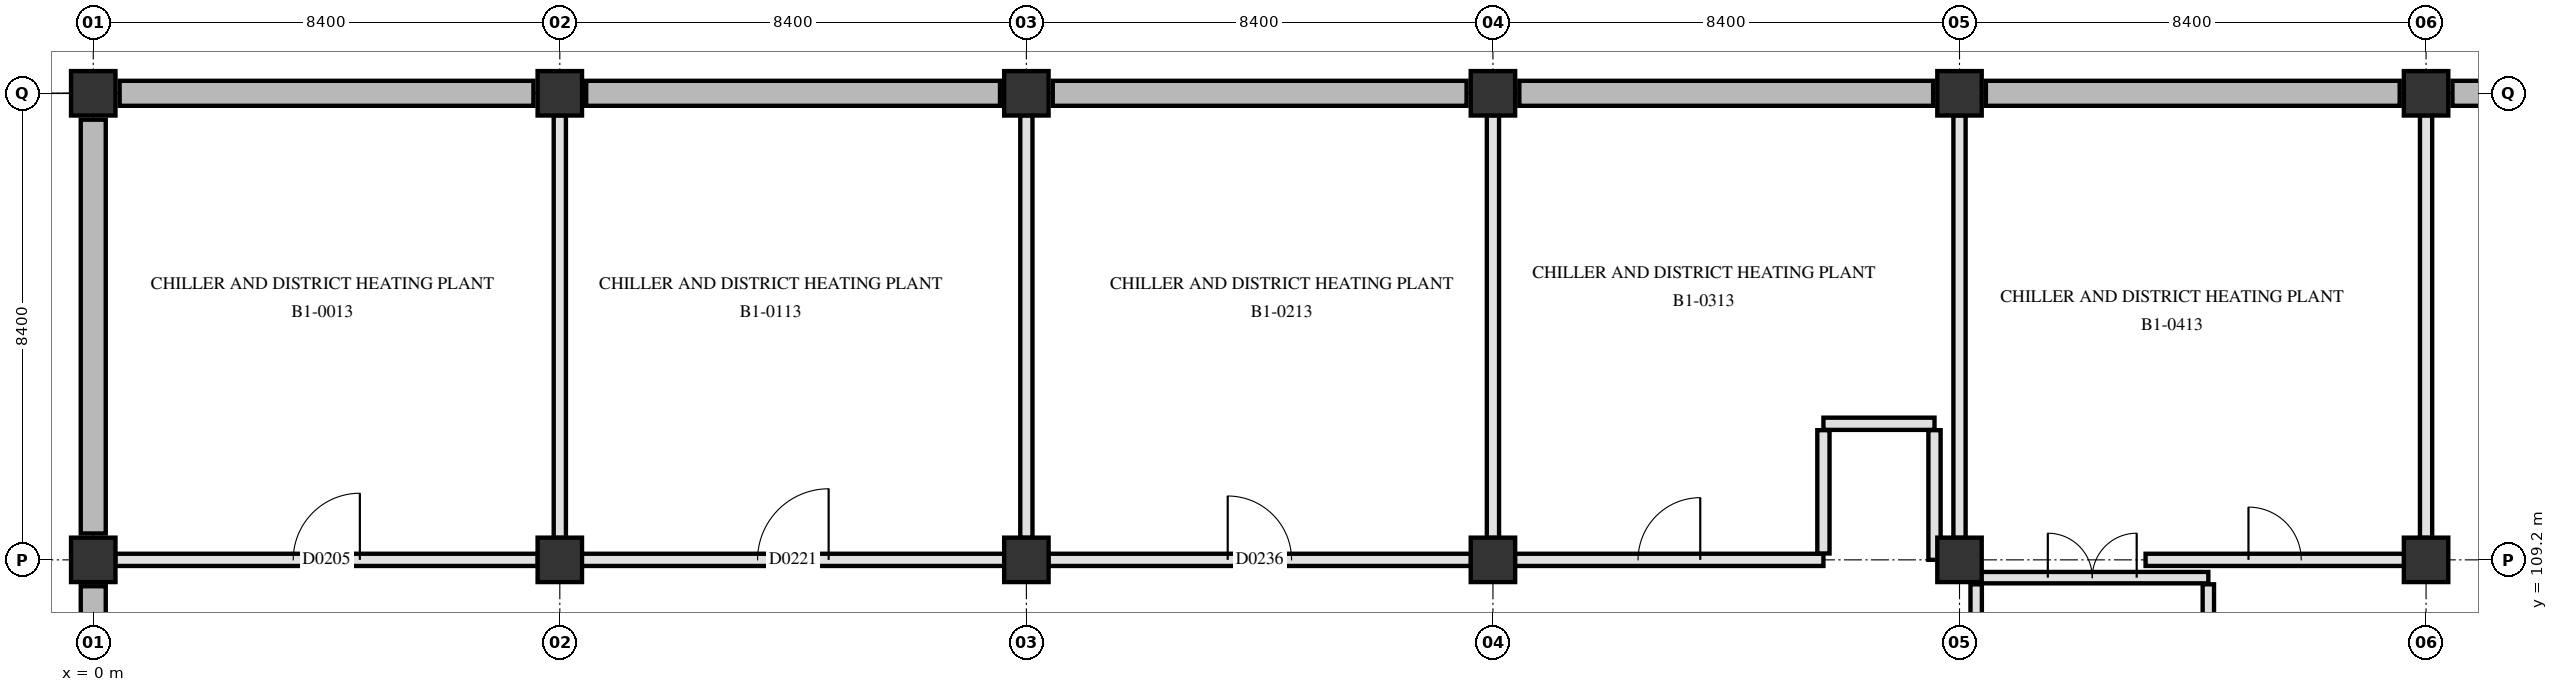
"""IFC4 building model, lengths in metres.
Left out: names, types, materials, properties, quantities, classifications, styles, units other than length and angle.
Written with IfcOpenShell. Run it as: python <this file> out.ifc"""

import sys

from ifc_helpers import new_model, si_unit, direction, frame, frame_2d, origin, origin_2d, place, context, subcontext, project, spatial, rectangle, extrude, element, fill, save


model = new_model("IFC4")
c1 = context("Model", 3, precision=1e-05, world=origin(), true_north=direction((0.0, 1.0)))
c2 = subcontext(c1, "Body", "Model", "MODEL_VIEW")
j1 = project(units=[si_unit("LENGTHUNIT", "METRE"), si_unit("PLANEANGLEUNIT", "RADIAN")], contexts=[c1])
p1 = place(None, origin())
s1 = spatial("IfcSite", under=j1, at=p1, CompositionType="ELEMENT")
p2 = place(p1, origin())
s2 = spatial("IfcBuilding", under=s1, at=p2, CompositionType="ELEMENT")
p3 = place(p2, frame((0.0, 0.0, -5.4)))
s3 = spatial("IfcBuildingStorey", under=s2, at=p3, CompositionType="ELEMENT", Elevation=-5.4)
for number, where, z_axis, x_axis in (
    (1, (0.0, 109.2, 0.0), (0.0, 0.0, 1.0), (1.0, 0.0, 0.0)),
    (2, (0.0, 117.6, 0.0), (0.0, 0.0, 1.0), (1.0, 0.0, 0.0)),
    (3, (8.4, 109.2, 0.0), (0.0, 0.0, 1.0), (1.0, 0.0, 0.0)),
    (4, (8.4, 117.6, 0.0), (0.0, 0.0, 1.0), (1.0, 0.0, 0.0)),
    (5, (16.8, 109.2, 0.0), (0.0, 0.0, 1.0), (1.0, 0.0, 0.0)),
    (6, (16.8, 117.6, 0.0), (0.0, 0.0, 1.0), (1.0, 0.0, 0.0)),
    (7, (25.2, 109.2, 0.0), (0.0, 0.0, 1.0), (1.0, 0.0, 0.0)),
    (8, (25.2, 117.6, 0.0), (0.0, 0.0, 1.0), (1.0, 0.0, 0.0)),
    (9, (33.6, 109.2, 0.0), (0.0, 0.0, 1.0), (1.0, 0.0, 0.0)),
    (10, (33.6, 117.6, 0.0), (0.0, 0.0, 1.0), (1.0, 0.0, 0.0)),
    (11, (42.0, 109.2, 0.0), (0.0, 0.0, 1.0), (1.0, 0.0, 0.0)),
    (12, (42.0, 117.6, 0.0), (0.0, 0.0, 1.0), (1.0, 0.0, 0.0)),
):
    element("IfcColumn", number, at=place(p3, frame(where, z_axis=z_axis, x_axis=x_axis)), inside=s3, PredefinedType="COLUMN", context=c2, shape_type="SweptSolid", body=[
        extrude(rectangle(XDim=0.8, YDim=0.8, at=origin_2d()), origin(), (0.0, 0.0, 1.0), 5.4),
    ])
p4 = place(p3, frame((0.0, 101.275, 0.0), z_axis=(0.0, 0.0, 1.0), x_axis=(0.0, 1.0, 0.0)))
e13 = element("IfcWall", 13, at=p4, inside=s3, PredefinedType="SOLIDWALL", context=c2, shape_type="SweptSolid", body=[
    extrude(rectangle(XDim=7.45, YDim=0.45, at=frame_2d((3.725, 0.0))), origin(), (0.0, 0.0, 1.0), 5.08),
])
for number, where, z_axis, x_axis in (
    (14, (0.0, 109.675, 0.0), (0.0, 0.0, 1.0), (0.0, 1.0, 0.0)),
    (15, (0.475, 117.6, 0.0), (0.0, 0.0, 1.0), (1.0, 0.0, 0.0)),
    (16, (8.875, 117.6, 0.0), (0.0, 0.0, 1.0), (1.0, 0.0, 0.0)),
):
    element("IfcWall", number, at=place(p3, frame(where, z_axis=z_axis, x_axis=x_axis)), inside=s3, PredefinedType="SOLIDWALL", context=c2, shape_type="SweptSolid", body=[
        extrude(rectangle(XDim=7.45, YDim=0.45, at=frame_2d((3.725, 0.0))), origin(), (0.0, 0.0, 1.0), 5.08),
    ])
p5 = place(p3, frame((17.275, 117.6, 0.0), z_axis=(0.0, 0.0, 1.0), x_axis=(1.0, 0.0, 0.0)))
e17 = element("IfcWall", 17, at=p5, inside=s3, PredefinedType="SOLIDWALL", context=c2, shape_type="SweptSolid", body=[
    extrude(rectangle(XDim=7.45, YDim=0.45, at=frame_2d((3.725, 0.0))), origin(), (0.0, 0.0, 1.0), 5.08),
])
for number, where, z_axis, x_axis in (
    (18, (25.675, 117.6, 0.0), (0.0, 0.0, 1.0), (1.0, 0.0, 0.0)),
    (19, (34.075, 117.6, 0.0), (0.0, 0.0, 1.0), (1.0, 0.0, 0.0)),
    (20, (42.475, 117.6, 0.0), (0.0, 0.0, 1.0), (1.0, 0.0, 0.0)),
):
    element("IfcWall", number, at=place(p3, frame(where, z_axis=z_axis, x_axis=x_axis)), inside=s3, PredefinedType="SOLIDWALL", context=c2, shape_type="SweptSolid", body=[
        extrude(rectangle(XDim=7.45, YDim=0.45, at=frame_2d((3.725, 0.0))), origin(), (0.0, 0.0, 1.0), 5.08),
    ])
p6 = place(p3, frame((38.08, 104.64, 0.0), z_axis=(0.0, 0.0, 1.0), x_axis=(0.0, 1.0, 0.0)))
e21 = element("IfcWall", 21, at=p6, inside=s3, PredefinedType="PARTITIONING", context=c2, shape_type="SweptSolid", body=[
    extrude(rectangle(XDim=4.12, YDim=0.205, at=frame_2d((2.06, 0.0))), origin(), (0.0, 0.0, 1.0), 5.07),
])
p7 = place(p3, frame((33.9, 104.64, 0.0), z_axis=(0.0, 0.0, 1.0), x_axis=(0.0, 1.0, 0.0)))
e22 = element("IfcWall", 22, at=p7, inside=s3, PredefinedType="PARTITIONING", context=c2, shape_type="SweptSolid", body=[
    extrude(rectangle(XDim=4.12, YDim=0.205, at=frame_2d((2.06, 0.0))), origin(), (0.0, 0.0, 1.0), 4.47),
])
p8 = place(p3, frame((33.9, 108.88, 0.0), z_axis=(0.0, 0.0, 1.0), x_axis=(1.0, 0.0, 0.0)))
e23 = element("IfcWall", 23, at=p8, inside=s3, PredefinedType="PARTITIONING", context=c2, shape_type="SweptSolid", body=[
    extrude(rectangle(XDim=4.18, YDim=0.205, at=frame_2d((2.09, 0.0))), origin(), (0.0, 0.0, 1.0), 4.42),
])
p9 = place(p8, frame((1.29, 0.0, 0.0)))
e24 = element("IfcOpeningElement", 24, at=p9, cuts=e23, PredefinedType="OPENING", context=c2, shape_type="SweptSolid", body=[
    extrude(rectangle(XDim=1.6, YDim=2.25, at=frame_2d((0.8, 1.125))), frame((0.0, 0.113, 0.0), z_axis=(0.0, -1.0, 0.0), x_axis=(1.0, 0.0, 0.0)), (0.0, 0.0, 1.0), 0.225),
])
p10 = place(p3, frame((0.395, 109.2, 0.0), z_axis=(0.0, 0.0, 1.0), x_axis=(1.0, 0.0, 0.0)))
e25 = element("IfcWall", 25, at=p10, inside=s3, PredefinedType="PARTITIONING", context=c2, shape_type="SweptSolid", body=[
    extrude(rectangle(XDim=7.61, YDim=0.22, at=frame_2d((3.805, 0.0))), origin(), (0.0, 0.0, 1.0), 4.42),
])
p11 = place(p10, frame((3.205, 0.0, 0.0)))
e26 = element("IfcOpeningElement", 26, at=p11, cuts=e25, PredefinedType="OPENING", context=c2, shape_type="SweptSolid", body=[
    extrude(rectangle(XDim=1.2, YDim=2.15, at=frame_2d((0.6, 1.075))), frame((0.0, 0.12, 0.0), z_axis=(0.0, -1.0, 0.0), x_axis=(1.0, 0.0, 0.0)), (0.0, 0.0, 1.0), 0.24),
])
p12 = place(p3, frame((8.795, 109.2, 0.0), z_axis=(0.0, 0.0, 1.0), x_axis=(1.0, 0.0, 0.0)))
e27 = element("IfcWall", 27, at=p12, inside=s3, PredefinedType="PARTITIONING", context=c2, shape_type="SweptSolid", body=[
    extrude(rectangle(XDim=7.61, YDim=0.22, at=frame_2d((3.805, 0.0))), origin(), (0.0, 0.0, 1.0), 4.42),
])
p13 = place(p12, frame((3.165, 0.0, 0.0)))
e28 = element("IfcOpeningElement", 28, at=p13, cuts=e27, PredefinedType="OPENING", context=c2, shape_type="SweptSolid", body=[
    extrude(rectangle(XDim=1.28, YDim=2.18, at=frame_2d((0.64, 1.09))), frame((0.0, 0.12, 0.0), z_axis=(0.0, -1.0, 0.0), x_axis=(1.0, 0.0, 0.0)), (0.0, 0.0, 1.0), 0.24),
])
p14 = place(p3, frame((17.195, 109.2, 0.0), z_axis=(0.0, 0.0, 1.0), x_axis=(1.0, 0.0, 0.0)))
e29 = element("IfcWall", 29, at=p14, inside=s3, PredefinedType="PARTITIONING", context=c2, shape_type="SweptSolid", body=[
    extrude(rectangle(XDim=7.61, YDim=0.22, at=frame_2d((3.805, 0.0))), origin(), (0.0, 0.0, 1.0), 4.42),
])
p15 = place(p14, frame((3.23, 0.0, 0.0)))
e30 = element("IfcOpeningElement", 30, at=p15, cuts=e29, PredefinedType="OPENING", context=c2, shape_type="SweptSolid", body=[
    extrude(rectangle(XDim=1.15, YDim=2.15, at=frame_2d((0.575, 1.075))), frame((0.0, 0.12, 0.0), z_axis=(0.0, -1.0, 0.0), x_axis=(1.0, 0.0, 0.0)), (0.0, 0.0, 1.0), 0.24),
])
p16 = place(p3, frame((25.595, 109.2, 0.0), z_axis=(0.0, 0.0, 1.0), x_axis=(1.0, 0.0, 0.0)))
e31 = element("IfcWall", 31, at=p16, inside=s3, PredefinedType="PARTITIONING", context=c2, shape_type="SweptSolid", body=[
    extrude(rectangle(XDim=5.555, YDim=0.22, at=frame_2d((2.777, 0.0))), origin(), (0.0, 0.0, 1.0), 4.42),
])
p17 = place(p16, frame((2.218, 0.0, 0.0)))
e32 = element("IfcOpeningElement", 32, at=p17, cuts=e31, PredefinedType="OPENING", context=c2, shape_type="SweptSolid", body=[
    extrude(rectangle(XDim=1.12, YDim=2.18, at=frame_2d((0.56, 1.09))), frame((0.0, 0.12, 0.0), z_axis=(0.0, -1.0, 0.0), x_axis=(1.0, 0.0, 0.0)), (0.0, 0.0, 1.0), 0.24),
])
p18 = place(p3, frame((36.95, 109.2, 0.0), z_axis=(0.0, 0.0, 1.0), x_axis=(1.0, 0.0, 0.0)))
e33 = element("IfcWall", 33, at=p18, inside=s3, PredefinedType="PARTITIONING", context=c2, shape_type="SweptSolid", body=[
    extrude(rectangle(XDim=4.655, YDim=0.22, at=frame_2d((2.328, 0.0))), origin(), (0.0, 0.0, 1.0), 4.42),
])
p19 = place(p18, frame((1.853, 0.0, 0.0)))
e34 = element("IfcOpeningElement", 34, at=p19, cuts=e33, PredefinedType="OPENING", context=c2, shape_type="SweptSolid", body=[
    extrude(rectangle(XDim=0.95, YDim=2.1, at=frame_2d((0.475, 1.05))), frame((0.0, 0.12, 0.0), z_axis=(0.0, -1.0, 0.0), x_axis=(1.0, 0.0, 0.0)), (0.0, 0.0, 1.0), 0.24),
])
p20 = place(p3, frame((31.15, 111.65, 0.0), z_axis=(0.0, 0.0, 1.0), x_axis=(1.0, 0.0, 0.0)))
e35 = element("IfcWall", 35, at=p20, inside=s3, PredefinedType="PARTITIONING", context=c2, shape_type="SweptSolid", body=[
    extrude(rectangle(XDim=2.0, YDim=0.22, at=frame_2d((1.0, 0.0))), origin(), (0.0, 0.0, 1.0), 5.07),
])
for number, where, z_axis, x_axis in (
    (36, (8.4, 109.595, 0.0), (0.0, 0.0, 1.0), (0.0, 1.0, 0.0)),
    (37, (16.8, 109.595, 0.0), (0.0, 0.0, 1.0), (0.0, 1.0, 0.0)),
    (38, (25.2, 109.595, 0.0), (0.0, 0.0, 1.0), (0.0, 1.0, 0.0)),
):
    element("IfcWall", number, at=place(p3, frame(where, z_axis=z_axis, x_axis=x_axis)), inside=s3, PredefinedType="PARTITIONING", context=c2, shape_type="SweptSolid", body=[
        extrude(rectangle(XDim=7.61, YDim=0.22, at=frame_2d((3.805, 0.0))), origin(), (0.0, 0.0, 1.0), 4.47),
    ])
p21 = place(p3, frame((31.15, 109.315, 0.0), z_axis=(0.0, 0.0, 1.0), x_axis=(0.0, 1.0, 0.0)))
e39 = element("IfcWall", 39, at=p21, inside=s3, PredefinedType="PARTITIONING", context=c2, shape_type="SweptSolid", body=[
    extrude(rectangle(XDim=2.22, YDim=0.22, at=frame_2d((1.11, 0.0))), origin(), (0.0, 0.0, 1.0), 4.42),
])
p22 = place(p3, frame((33.15, 109.2, 0.0), z_axis=(0.0, 0.0, 1.0), x_axis=(0.0, 1.0, 0.0)))
e40 = element("IfcWall", 40, at=p22, inside=s3, PredefinedType="PARTITIONING", context=c2, shape_type="SweptSolid", body=[
    extrude(rectangle(XDim=2.335, YDim=0.22, at=frame_2d((1.167, 0.0))), origin(), (0.0, 0.0, 1.0), 4.42),
])
for number, where, z_axis, x_axis in (
    (41, (33.6, 109.595, 0.0), (0.0, 0.0, 1.0), (0.0, 1.0, 0.0)),
    (42, (42.0, 109.595, 0.0), (0.0, 0.0, 1.0), (0.0, 1.0, 0.0)),
):
    element("IfcWall", number, at=place(p3, frame(where, z_axis=z_axis, x_axis=x_axis)), inside=s3, PredefinedType="PARTITIONING", context=c2, shape_type="SweptSolid", body=[
        extrude(rectangle(XDim=7.61, YDim=0.22, at=frame_2d((3.805, 0.0))), origin(), (0.0, 0.0, 1.0), 4.47),
    ])
p23 = place(p9, origin())
e43 = element("IfcDoor", 43, at=p23, inside=s3, OperationType="DOUBLE_SWING_LEFT", PredefinedType="DOOR", context=c2, shape_type="SweptSolid", body=[
    extrude(rectangle(XDim=1.6, YDim=2.25, at=frame_2d((0.8, 1.125))), frame((0.0, 0.025, 0.0), z_axis=(0.0, -1.0, 0.0), x_axis=(1.0, 0.0, 0.0)), (0.0, 0.0, 1.0), 0.05),
])
fill(e24, e43)
p24 = place(p11, origin())
e44 = element("IfcDoor", 44, at=p24, inside=s3, OperationType="SINGLE_SWING_RIGHT", PredefinedType="DOOR", context=c2, shape_type="SweptSolid", body=[
    extrude(rectangle(XDim=1.2, YDim=2.15, at=frame_2d((0.6, 1.075))), frame((0.0, 0.025, 0.0), z_axis=(0.0, -1.0, 0.0), x_axis=(1.0, 0.0, 0.0)), (0.0, 0.0, 1.0), 0.05),
])
fill(e26, e44)
p25 = place(p13, origin())
e45 = element("IfcDoor", 45, at=p25, inside=s3, OperationType="SINGLE_SWING_RIGHT", PredefinedType="DOOR", context=c2, shape_type="SweptSolid", body=[
    extrude(rectangle(XDim=1.28, YDim=2.18, at=frame_2d((0.64, 1.09))), frame((0.0, 0.025, 0.0), z_axis=(0.0, -1.0, 0.0), x_axis=(1.0, 0.0, 0.0)), (0.0, 0.0, 1.0), 0.05),
])
fill(e28, e45)
p26 = place(p15, origin())
e46 = element("IfcDoor", 46, at=p26, inside=s3, OperationType="SINGLE_SWING_LEFT", PredefinedType="DOOR", context=c2, shape_type="SweptSolid", body=[
    extrude(rectangle(XDim=1.15, YDim=2.15, at=frame_2d((0.575, 1.075))), frame((0.0, 0.025, 0.0), z_axis=(0.0, -1.0, 0.0), x_axis=(1.0, 0.0, 0.0)), (0.0, 0.0, 1.0), 0.05),
])
fill(e30, e46)
p27 = place(p17, origin())
e47 = element("IfcDoor", 47, at=p27, inside=s3, OperationType="SINGLE_SWING_RIGHT", PredefinedType="DOOR", context=c2, shape_type="SweptSolid", body=[
    extrude(rectangle(XDim=1.12, YDim=2.18, at=frame_2d((0.56, 1.09))), frame((0.0, 0.025, 0.0), z_axis=(0.0, -1.0, 0.0), x_axis=(1.0, 0.0, 0.0)), (0.0, 0.0, 1.0), 0.05),
])
fill(e32, e47)
p28 = place(p19, origin())
e48 = element("IfcDoor", 48, at=p28, inside=s3, OperationType="SINGLE_SWING_LEFT", PredefinedType="DOOR", context=c2, shape_type="SweptSolid", body=[
    extrude(rectangle(XDim=0.95, YDim=2.1, at=frame_2d((0.475, 1.05))), frame((0.0, 0.025, 0.0), z_axis=(0.0, -1.0, 0.0), x_axis=(1.0, 0.0, 0.0)), (0.0, 0.0, 1.0), 0.05),
])
fill(e34, e48)
save(model, sys.argv[1])
